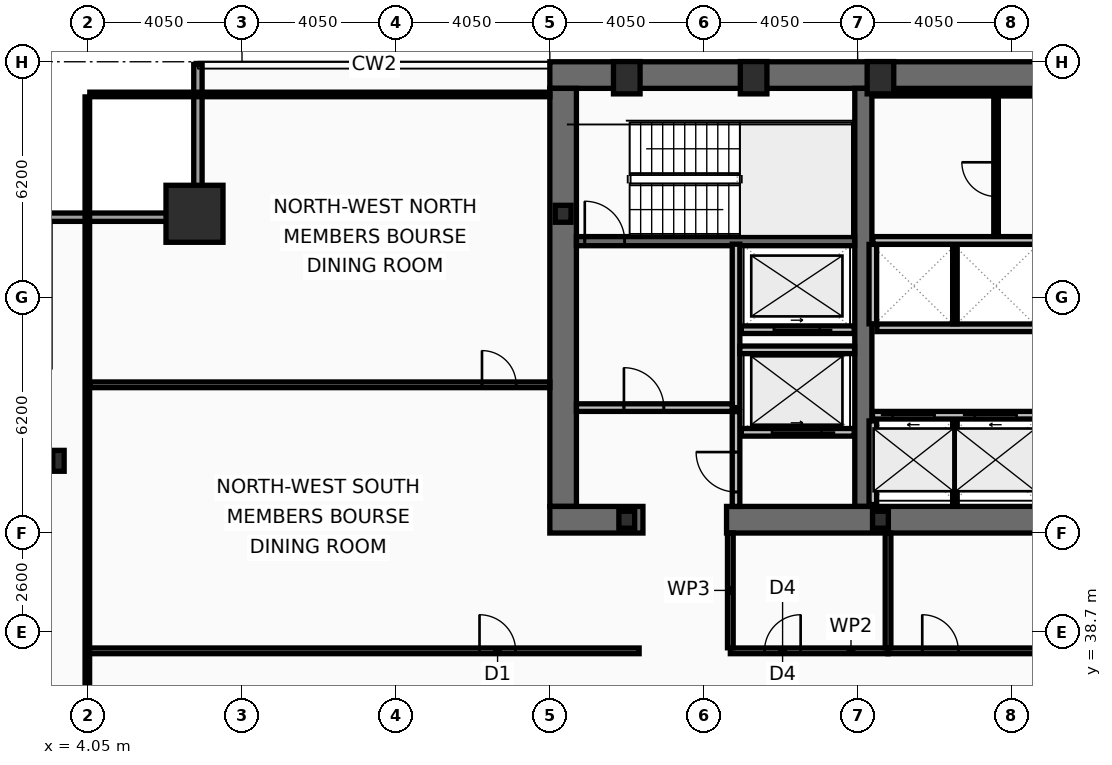
"""IFC4 building model, lengths in metres.
Left out: names, types, materials, properties, quantities, classifications, styles, units other than length and angle.
Written with IfcOpenShell. Run it as: python <this file> out.ifc"""

import sys

from ifc_helpers import new_model, si_unit, direction, frame, frame_2d, origin, origin_2d, place, context, subcontext, project, spatial, rectangle, hollow_rectangle, i_section, extrude, element, fill, save


model = new_model("IFC4")
c1 = context("Model", 3, precision=1e-05, world=origin(), true_north=direction((0.0, 1.0)))
c2 = subcontext(c1, "Body", "Model", "MODEL_VIEW")
j1 = project(units=[si_unit("LENGTHUNIT", "METRE"), si_unit("PLANEANGLEUNIT", "RADIAN")], contexts=[c1])
p1 = place(None, origin())
s1 = spatial("IfcSite", under=j1, at=p1, CompositionType="ELEMENT")
p2 = place(p1, origin())
s2 = spatial("IfcBuilding", under=s1, at=p2, CompositionType="ELEMENT")
p3 = place(p2, frame((0.0, 0.0, 111.0)))
s3 = spatial("IfcBuildingStorey", under=s2, at=p3, CompositionType="ELEMENT", Elevation=111.0)
p4 = place(p3, frame((16.2, 53.35, 0.0), z_axis=(0.0, 0.0, 1.0), x_axis=(1.0, 0.0, 0.0)))
e1 = element("IfcWall", 1, at=p4, inside=s3, PredefinedType="SHEAR", context=c2, shape_type="SweptSolid", body=[
    extrude(rectangle(XDim=40.5, YDim=0.7, at=frame_2d((20.25, 0.0))), origin(), (0.0, 0.0, 1.0), 3.44),
])
p5 = place(p3, frame((16.55, 42.0, 0.0), z_axis=(0.0, 0.0, 1.0), x_axis=(0.0, 1.0, 0.0)))
e2 = element("IfcWall", 2, at=p5, inside=s3, PredefinedType="SHEAR", context=c2, shape_type="SweptSolid", body=[
    extrude(rectangle(XDim=11.0, YDim=0.7, at=frame_2d((5.5, 0.0))), origin(), (0.0, 0.0, 1.0), 3.44),
])
p6 = place(p3, frame((24.45, 42.0, 0.0), z_axis=(0.0, 0.0, 1.0), x_axis=(0.0, 1.0, 0.0)))
e3 = element("IfcWall", 3, at=p6, inside=s3, PredefinedType="SHEAR", context=c2, shape_type="SweptSolid", body=[
    extrude(rectangle(XDim=11.0, YDim=0.45, at=frame_2d((5.5, 0.0))), origin(), (0.0, 0.0, 1.0), 3.44),
])
p7 = place(p3, frame((18.65, 41.65, 0.0), z_axis=(0.0, 0.0, 1.0), x_axis=(-1.0, 0.0, 0.0)))
e4 = element("IfcWall", 4, at=p7, inside=s3, PredefinedType="SHEAR", context=c2, shape_type="SweptSolid", body=[
    extrude(rectangle(XDim=2.45, YDim=0.7, at=frame_2d((1.225, 0.0))), origin(), (0.0, 0.0, 1.0), 3.44),
])
p8 = place(p3, frame((32.3, 41.65, 0.0), z_axis=(0.0, 0.0, 1.0), x_axis=(-1.0, 0.0, 0.0)))
e5 = element("IfcWall", 5, at=p8, inside=s3, PredefinedType="SHEAR", context=c2, shape_type="SweptSolid", body=[
    extrude(rectangle(XDim=11.45, YDim=0.7, at=frame_2d((5.725, 0.0))), origin(), (0.0, 0.0, 1.0), 3.44),
])
p9 = place(p3, frame((16.9, 48.98, 0.0), z_axis=(0.0, 0.0, 1.0), x_axis=(1.0, 0.0, 0.0)))
e6 = element("IfcWall", 6, at=p9, inside=s3, PredefinedType="SHEAR", context=c2, shape_type="SweptSolid", body=[
    extrude(rectangle(XDim=7.32, YDim=0.24, at=frame_2d((3.66, 0.0))), origin(), (0.0, 0.0, 1.0), 3.44),
])
p10 = place(p9, frame((0.22, 0.0, 0.0)))
e7 = element("IfcOpeningElement", 7, at=p10, cuts=e6, PredefinedType="OPENING", context=c2, shape_type="SweptSolid", body=[
    extrude(rectangle(XDim=1.05, YDim=2.15, at=frame_2d((0.525, 1.075))), frame((0.0, 0.13, 0.0), z_axis=(0.0, -1.0, 0.0), x_axis=(1.0, 0.0, 0.0)), (0.0, 0.0, 1.0), 0.26),
])
p11 = place(p3, frame((6.85, 49.7, 0.0), z_axis=(0.0, 0.0, 1.0), x_axis=(1.0, 0.0, 0.0)))
e8 = element("IfcColumn", 8, at=p11, inside=s3, PredefinedType="COLUMN", context=c2, shape_type="SweptSolid", body=[
    extrude(hollow_rectangle(XDim=1.5, YDim=1.5, WallThickness=0.07, at=origin_2d()), origin(), (0.0, 0.0, 1.0), 3.6),
])
for number, where, z_axis, x_axis in (
    (9, (18.225, 53.28, 0.0), (0.0, 0.0, 1.0), (1.0, 0.0, 0.0)),
    (10, (21.562, 53.28, 0.0), (0.0, 0.0, 1.0), (1.0, 0.0, 0.0)),
    (11, (24.9, 53.28, 0.0), (0.0, 0.0, 1.0), (1.0, 0.0, 0.0)),
):
    element("IfcColumn", number, at=place(p3, frame(where, z_axis=z_axis, x_axis=x_axis)), inside=s3, PredefinedType="COLUMN", context=c2, shape_type="SweptSolid", body=[
        extrude(hollow_rectangle(XDim=0.7, YDim=0.85, WallThickness=0.05, at=origin_2d()), origin(), (0.0, 0.0, 1.0), 3.6),
    ])
p12 = place(p3, frame((3.27, 43.2, 0.0), z_axis=(0.0, 0.0, 1.0), x_axis=(1.0, 0.0, 0.0)))
e12 = element("IfcColumn", 12, at=p12, inside=s3, PredefinedType="COLUMN", context=c2, shape_type="SweptSolid", body=[
    extrude(i_section(OverallWidth=0.3, OverallDepth=0.55, WebThickness=0.015, FlangeThickness=0.029, at=origin_2d()), origin(), (0.0, 0.0, 1.0), 3.6),
])
for number, where, z_axis, x_axis in (
    (13, (16.55, 49.7, 0.0), (0.0, 0.0, 1.0), (1.0, 0.0, 0.0)),
    (14, (18.225, 41.65, 0.0), (0.0, 0.0, 1.0), (1.0, 0.0, 0.0)),
    (15, (24.9, 41.65, 0.0), (0.0, 0.0, 1.0), (1.0, 0.0, 0.0)),
):
    element("IfcColumn", number, at=place(p3, frame(where, z_axis=z_axis, x_axis=x_axis)), inside=s3, PredefinedType="COLUMN", context=c2, shape_type="SweptSolid", body=[
        extrude(i_section(OverallWidth=0.416, OverallDepth=0.446, WebThickness=0.039, FlangeThickness=0.063, at=origin_2d()), origin(), (0.0, 0.0, 1.0), 3.6),
    ])
p13 = place(p3, frame((2.83, 49.61, 0.0), z_axis=(0.0, 0.0, 1.0), x_axis=(1.0, 0.0, 0.0)))
e16 = element("IfcWall", 16, at=p13, inside=s3, PredefinedType="SOLIDWALL", context=c2, shape_type="SweptSolid", body=[
    extrude(rectangle(XDim=4.22, YDim=0.22, at=frame_2d((2.11, 0.0))), origin(), (0.0, 0.0, 1.0), 2.83),
])
p14 = place(p3, frame((6.94, 49.72, 0.0), z_axis=(0.0, 0.0, 1.0), x_axis=(0.0, 1.0, 0.0)))
e17 = element("IfcWall", 17, at=p14, inside=s3, PredefinedType="SOLIDWALL", context=c2, shape_type="SweptSolid", body=[
    extrude(rectangle(XDim=3.91, YDim=0.22, at=frame_2d((1.955, 0.0))), origin(), (0.0, 0.0, 1.0), 2.83),
])
p15 = place(p3, frame((24.69, 44.4, 0.0), z_axis=(0.0, 0.0, 1.0), x_axis=(1.0, 0.0, 0.0)))
e18 = element("IfcWall", 18, at=p15, inside=s3, PredefinedType="PARTITIONING", context=c2, shape_type="SweptSolid", body=[
    extrude(rectangle(XDim=6.53, YDim=0.2, at=frame_2d((3.265, 0.0))), origin(), (0.0, 0.0, 1.0), 3.44),
])
p16 = place(p15, frame((0.53, 0.0, 0.0)))
e19 = element("IfcOpeningElement", 19, at=p16, cuts=e18, PredefinedType="OPENING", context=c2, shape_type="SweptSolid", body=[
    extrude(rectangle(XDim=1.1, YDim=2.18, at=frame_2d((0.55, 1.09))), frame((0.0, 0.11, 0.0), z_axis=(0.0, -1.0, 0.0), x_axis=(1.0, 0.0, 0.0)), (0.0, 0.0, 1.0), 0.22),
])
p17 = place(p15, frame((2.69, 0.0, 0.0)))
e20 = element("IfcOpeningElement", 20, at=p17, cuts=e18, PredefinedType="OPENING", context=c2, shape_type="SweptSolid", body=[
    extrude(rectangle(XDim=1.1, YDim=2.18, at=frame_2d((0.55, 1.09))), frame((0.0, 0.11, 0.0), z_axis=(0.0, -1.0, 0.0), x_axis=(1.0, 0.0, 0.0)), (0.0, 0.0, 1.0), 0.22),
])
p18 = place(p15, frame((4.85, 0.0, 0.0)))
e21 = element("IfcOpeningElement", 21, at=p18, cuts=e18, PredefinedType="OPENING", context=c2, shape_type="SweptSolid", body=[
    extrude(rectangle(XDim=1.1, YDim=2.18, at=frame_2d((0.55, 1.09))), frame((0.0, 0.11, 0.0), z_axis=(0.0, -1.0, 0.0), x_axis=(1.0, 0.0, 0.0)), (0.0, 0.0, 1.0), 0.22),
])
p19 = place(p3, frame((24.21, 43.95, 0.0), z_axis=(0.0, 0.0, 1.0), x_axis=(-1.0, 0.0, 0.0)))
e22 = element("IfcWall", 22, at=p19, inside=s3, PredefinedType="PARTITIONING", context=c2, shape_type="SweptSolid", body=[
    extrude(rectangle(XDim=2.97, YDim=0.2, at=frame_2d((1.485, 0.0))), origin(), (0.0, 0.0, 1.0), 3.44),
])
p20 = place(p19, frame((0.86, 0.0, 0.0)))
e23 = element("IfcOpeningElement", 23, at=p20, cuts=e22, PredefinedType="OPENING", context=c2, shape_type="SweptSolid", body=[
    extrude(rectangle(XDim=1.3, YDim=2.18, at=frame_2d((0.65, 1.09))), frame((0.0, 0.11, 0.0), z_axis=(0.0, -1.0, 0.0), x_axis=(1.0, 0.0, 0.0)), (0.0, 0.0, 1.0), 0.22),
])
p21 = place(p3, frame((24.21, 46.65, 0.0), z_axis=(0.0, 0.0, 1.0), x_axis=(-1.0, 0.0, 0.0)))
e24 = element("IfcWall", 24, at=p21, inside=s3, PredefinedType="PARTITIONING", context=c2, shape_type="SweptSolid", body=[
    extrude(rectangle(XDim=2.97, YDim=0.2, at=frame_2d((1.485, 0.0))), origin(), (0.0, 0.0, 1.0), 3.44),
])
p22 = place(p21, frame((0.91, 0.0, 0.0)))
e25 = element("IfcOpeningElement", 25, at=p22, cuts=e24, PredefinedType="OPENING", context=c2, shape_type="SweptSolid", body=[
    extrude(rectangle(XDim=1.2, YDim=2.18, at=frame_2d((0.6, 1.09))), frame((0.0, 0.11, 0.0), z_axis=(0.0, -1.0, 0.0), x_axis=(1.0, 0.0, 0.0)), (0.0, 0.0, 1.0), 0.22),
])
p23 = place(p3, frame((21.1, 44.6, 0.0), z_axis=(0.0, 0.0, 1.0), x_axis=(0.0, 1.0, 0.0)))
e26 = element("IfcWall", 26, at=p23, inside=s3, PredefinedType="PARTITIONING", context=c2, shape_type="SweptSolid", body=[
    extrude(rectangle(XDim=4.3, YDim=0.2, at=frame_2d((2.15, 0.0))), origin(), (0.0, 0.0, 1.0), 3.44),
])
p24 = place(p3, frame((16.9, 44.6, 0.0), z_axis=(0.0, 0.0, 1.0), x_axis=(1.0, 0.0, 0.0)))
e27 = element("IfcWall", 27, at=p24, inside=s3, PredefinedType="PARTITIONING", context=c2, shape_type="SweptSolid", body=[
    extrude(rectangle(XDim=4.1, YDim=0.2, at=frame_2d((2.05, 0.0))), origin(), (0.0, 0.0, 1.0), 3.44),
])
p25 = place(p24, frame((1.25, 0.0, 0.0)))
e28 = element("IfcOpeningElement", 28, at=p25, cuts=e27, PredefinedType="OPENING", context=c2, shape_type="SweptSolid", body=[
    extrude(rectangle(XDim=1.05, YDim=2.15, at=frame_2d((0.525, 1.075))), frame((0.0, 0.11, 0.0), z_axis=(0.0, -1.0, 0.0), x_axis=(1.0, 0.0, 0.0)), (0.0, 0.0, 1.0), 0.22),
])
p26 = place(p3, frame((21.2, 46.12, 0.0), z_axis=(0.0, 0.0, 1.0), x_axis=(1.0, 0.0, 0.0)))
e29 = element("IfcWall", 29, at=p26, inside=s3, PredefinedType="PARTITIONING", context=c2, shape_type="SweptSolid", body=[
    extrude(rectangle(XDim=3.02, YDim=0.2, at=frame_2d((1.51, 0.0))), origin(), (0.0, 0.0, 1.0), 3.44),
])
p27 = place(p3, frame((21.1, 42.0, 0.0), z_axis=(0.0, 0.0, 1.0), x_axis=(0.0, 1.0, 0.0)))
e30 = element("IfcWall", 30, at=p27, inside=s3, PredefinedType="PARTITIONING", context=c2, shape_type="SweptSolid", body=[
    extrude(rectangle(XDim=2.495, YDim=0.2, at=frame_2d((1.248, 0.0))), origin(), (0.0, 0.0, 1.0), 3.44),
])
p28 = place(p27, frame((0.38, 0.0, 0.0)))
e31 = element("IfcOpeningElement", 31, at=p28, cuts=e30, PredefinedType="OPENING", context=c2, shape_type="SweptSolid", body=[
    extrude(rectangle(XDim=1.05, YDim=2.15, at=frame_2d((0.525, 1.075))), frame((0.0, 0.11, 0.0), z_axis=(0.0, -1.0, 0.0), x_axis=(1.0, 0.0, 0.0)), (0.0, 0.0, 1.0), 0.22),
])
p29 = place(p3, frame((24.805, 46.7, 0.0), z_axis=(0.0, 0.0, 1.0), x_axis=(1.0, 0.0, 0.0)))
e32 = element("IfcWall", 32, at=p29, inside=s3, PredefinedType="PARTITIONING", context=c2, shape_type="SweptSolid", body=[
    extrude(rectangle(XDim=6.27, YDim=0.2, at=frame_2d((3.135, 0.0))), origin(), (0.0, 0.0, 1.0), 3.44),
])
p30 = place(p3, frame((24.7, 46.805, 0.0), z_axis=(0.0, 0.0, 1.0), x_axis=(0.0, 1.0, 0.0)))
e33 = element("IfcWall", 33, at=p30, inside=s3, PredefinedType="PARTITIONING", context=c2, shape_type="SweptSolid", body=[
    extrude(rectangle(XDim=2.09, YDim=0.2, at=frame_2d((1.045, 0.0))), origin(), (0.0, 0.0, 1.0), 3.44),
])
p31 = place(p3, frame((26.86, 46.805, 0.0), z_axis=(0.0, 0.0, 1.0), x_axis=(0.0, 1.0, 0.0)))
e34 = element("IfcWall", 34, at=p31, inside=s3, PredefinedType="PARTITIONING", context=c2, shape_type="SweptSolid", body=[
    extrude(rectangle(XDim=2.09, YDim=0.12, at=frame_2d((1.045, 0.0))), origin(), (0.0, 0.0, 1.0), 3.44),
])
p32 = place(p3, frame((24.7, 42.05, 0.0), z_axis=(0.0, 0.0, 1.0), x_axis=(0.0, 1.0, 0.0)))
e35 = element("IfcWall", 35, at=p32, inside=s3, PredefinedType="PARTITIONING", context=c2, shape_type="SweptSolid", body=[
    extrude(rectangle(XDim=2.2, YDim=0.2, at=frame_2d((1.1, 0.0))), origin(), (0.0, 0.0, 1.0), 3.44),
])
p33 = place(p3, frame((26.86, 42.05, 0.0), z_axis=(0.0, 0.0, 1.0), x_axis=(0.0, 1.0, 0.0)))
e36 = element("IfcWall", 36, at=p33, inside=s3, PredefinedType="PARTITIONING", context=c2, shape_type="SweptSolid", body=[
    extrude(rectangle(XDim=2.2, YDim=0.12, at=frame_2d((1.1, 0.0))), origin(), (0.0, 0.0, 1.0), 3.44),
])
p34 = place(p3, frame((24.7, 52.86, 0.0), z_axis=(0.0, 0.0, 1.0), x_axis=(1.0, 0.0, 0.0)))
e37 = element("IfcWall", 37, at=p34, inside=s3, PredefinedType="PARTITIONING", context=c2, shape_type="SweptSolid", body=[
    extrude(rectangle(XDim=7.72, YDim=0.12, at=frame_2d((3.86, 0.0))), origin(), (0.0, 0.0, 1.0), 3.44),
])
p35 = place(p3, frame((24.7, 49.0, 0.0), z_axis=(0.0, 0.0, 1.0), x_axis=(1.0, 0.0, 0.0)))
e38 = element("IfcWall", 38, at=p35, inside=s3, PredefinedType="PARTITIONING", context=c2, shape_type="SweptSolid", body=[
    extrude(rectangle(XDim=7.72, YDim=0.2, at=frame_2d((3.86, 0.0))), origin(), (0.0, 0.0, 1.0), 3.44),
])
p36 = place(p35, frame((6.56, 0.0, 0.0)))
e39 = element("IfcOpeningElement", 39, at=p36, cuts=e38, PredefinedType="OPENING", context=c2, shape_type="SweptSolid", body=[
    extrude(rectangle(XDim=0.95, YDim=2.1, at=frame_2d((0.475, 1.05))), frame((0.0, 0.11, 0.0), z_axis=(0.0, -1.0, 0.0), x_axis=(1.0, 0.0, 0.0)), (0.0, 0.0, 1.0), 0.22),
])
p37 = place(p3, frame((27.942, 49.105, 0.0), z_axis=(0.0, 0.0, 1.0), x_axis=(0.0, 1.0, 0.0)))
e40 = element("IfcWall", 40, at=p37, inside=s3, PredefinedType="PARTITIONING", context=c2, shape_type="SweptSolid", body=[
    extrude(rectangle(XDim=3.69, YDim=0.12, at=frame_2d((1.845, 0.0))), origin(), (0.0, 0.0, 1.0), 3.44),
])
p38 = place(p37, frame((1.05, 0.0, 0.0)))
e41 = element("IfcOpeningElement", 41, at=p38, cuts=e40, PredefinedType="OPENING", context=c2, shape_type="SweptSolid", body=[
    extrude(rectangle(XDim=0.9, YDim=2.05, at=frame_2d((0.45, 1.025))), frame((0.0, 0.07, 0.0), z_axis=(0.0, -1.0, 0.0), x_axis=(1.0, 0.0, 0.0)), (0.0, 0.0, 1.0), 0.14),
])
p39 = place(p3, frame((20.95, 38.2, 0.0), z_axis=(0.0, 0.0, 1.0), x_axis=(1.0, 0.0, 0.0)))
e42 = element("IfcWall", 42, at=p39, inside=s3, PredefinedType="PARTITIONING", context=c2, shape_type="SweptSolid", body=[
    extrude(rectangle(XDim=4.15, YDim=0.15, at=frame_2d((2.075, 0.0))), origin(), (0.0, 0.0, 1.0), 2.73),
])
p40 = place(p39, frame((0.9, 0.0, 0.0)))
e43 = element("IfcOpeningElement", 43, at=p40, cuts=e42, PredefinedType="OPENING", context=c2, shape_type="SweptSolid", body=[
    extrude(rectangle(XDim=0.95, YDim=2.05, at=frame_2d((0.475, 1.025))), frame((0.0, 0.085, 0.0), z_axis=(0.0, -1.0, 0.0), x_axis=(1.0, 0.0, 0.0)), (0.0, 0.0, 1.0), 0.17),
])
p41 = place(p3, frame((25.1, 38.2, 0.0), z_axis=(0.0, 0.0, 1.0), x_axis=(1.0, 0.0, 0.0)))
e44 = element("IfcWall", 44, at=p41, inside=s3, PredefinedType="PARTITIONING", context=c2, shape_type="SweptSolid", body=[
    extrude(rectangle(XDim=4.1, YDim=0.15, at=frame_2d((2.05, 0.0))), origin(), (0.0, 0.0, 1.0), 2.73),
])
p42 = place(p41, frame((0.9, 0.0, 0.0)))
e45 = element("IfcOpeningElement", 45, at=p42, cuts=e44, PredefinedType="OPENING", context=c2, shape_type="SweptSolid", body=[
    extrude(rectangle(XDim=0.95, YDim=2.05, at=frame_2d((0.475, 1.025))), frame((0.0, 0.085, 0.0), z_axis=(0.0, -1.0, 0.0), x_axis=(1.0, 0.0, 0.0)), (0.0, 0.0, 1.0), 0.17),
])
p43 = place(p3, frame((20.95, 38.28, 0.0), z_axis=(0.0, 0.0, 1.0), x_axis=(0.0, 1.0, 0.0)))
e46 = element("IfcWall", 46, at=p43, inside=s3, PredefinedType="PARTITIONING", context=c2, shape_type="SweptSolid", body=[
    extrude(rectangle(XDim=3.02, YDim=0.15, at=frame_2d((1.51, 0.0))), origin(), (0.0, 0.0, 1.0), 3.44),
])
p44 = place(p3, frame((25.1, 38.28, 0.0), z_axis=(0.0, 0.0, 1.0), x_axis=(0.0, 1.0, 0.0)))
e47 = element("IfcWall", 47, at=p44, inside=s3, PredefinedType="PARTITIONING", context=c2, shape_type="SweptSolid", body=[
    extrude(rectangle(XDim=3.02, YDim=0.15, at=frame_2d((1.51, 0.0))), origin(), (0.0, 0.0, 1.0), 2.73),
])
p45 = place(p3, frame((4.03, 38.2, 0.0), z_axis=(0.0, 0.0, 1.0), x_axis=(1.0, 0.0, 0.0)))
e48 = element("IfcWall", 48, at=p45, inside=s3, PredefinedType="PARTITIONING", context=c2, shape_type="SweptSolid", body=[
    extrude(rectangle(XDim=14.52, YDim=0.15, at=frame_2d((7.26, 0.0))), origin(), (0.0, 0.0, 1.0), 2.73),
])
p46 = place(p45, frame((10.32, 0.0, 0.0)))
e49 = element("IfcOpeningElement", 49, at=p46, cuts=e48, PredefinedType="OPENING", context=c2, shape_type="SweptSolid", body=[
    extrude(rectangle(XDim=0.95, YDim=2.05, at=frame_2d((0.475, 1.025))), frame((0.0, 0.085, 0.0), z_axis=(0.0, -1.0, 0.0), x_axis=(1.0, 0.0, 0.0)), (0.0, 0.0, 1.0), 0.17),
])
p47 = place(p3, frame((4.095, 45.2, 0.0), z_axis=(0.0, 0.0, 1.0), x_axis=(1.0, 0.0, 0.0)))
e50 = element("IfcWall", 50, at=p47, inside=s3, PredefinedType="PARTITIONING", context=c2, shape_type="SweptSolid", body=[
    extrude(rectangle(XDim=12.105, YDim=0.15, at=frame_2d((6.052, 0.0))), origin(), (0.0, 0.0, 1.0), 2.83),
])
p48 = place(p47, frame((10.32, 0.0, 0.0)))
e51 = element("IfcOpeningElement", 51, at=p48, cuts=e50, PredefinedType="OPENING", context=c2, shape_type="SweptSolid", body=[
    extrude(rectangle(XDim=0.9, YDim=2.05, at=frame_2d((0.45, 1.025))), frame((0.0, 0.085, 0.0), z_axis=(0.0, -1.0, 0.0), x_axis=(1.0, 0.0, 0.0)), (0.0, 0.0, 1.0), 0.17),
])
p49 = place(p3, frame((4.03, 10.665, 0.0), z_axis=(0.0, 0.0, 1.0), x_axis=(0.0, 1.0, 0.0)))
e52 = element("IfcWall", 52, at=p49, inside=s3, PredefinedType="PARTITIONING", context=c2, shape_type="SweptSolid", body=[
    extrude(rectangle(XDim=42.11, YDim=0.12, at=frame_2d((21.055, 0.0))), origin(), (0.0, 0.0, 1.0), 2.73),
])
p50 = place(p3, frame((4.095, 52.84, 0.0), z_axis=(0.0, 0.0, 1.0), x_axis=(1.0, 0.0, 0.0)))
e53 = element("IfcWall", 53, at=p50, inside=s3, PredefinedType="PARTITIONING", context=c2, shape_type="SweptSolid", body=[
    extrude(rectangle(XDim=12.105, YDim=0.12, at=frame_2d((6.052, 0.0))), origin(), (0.0, 0.0, 1.0), 3.44),
])
p51 = place(p10, origin())
e54 = element("IfcDoor", 54, at=p51, inside=s3, OperationType="SINGLE_SWING_LEFT", PredefinedType="DOOR", context=c2, shape_type="SweptSolid", body=[
    extrude(rectangle(XDim=1.05, YDim=2.15, at=frame_2d((0.525, 1.075))), frame((0.0, 0.025, 0.0), z_axis=(0.0, -1.0, 0.0), x_axis=(1.0, 0.0, 0.0)), (0.0, 0.0, 1.0), 0.05),
])
fill(e7, e54)
p52 = place(p16, origin())
e55 = element("IfcDoor", 55, at=p52, inside=s3, OperationType="SLIDING_TO_LEFT", PredefinedType="DOOR", context=c2, shape_type="SweptSolid", body=[
    extrude(rectangle(XDim=1.1, YDim=2.18, at=frame_2d((0.55, 1.09))), frame((0.0, 0.025, 0.0), z_axis=(0.0, -1.0, 0.0), x_axis=(1.0, 0.0, 0.0)), (0.0, 0.0, 1.0), 0.05),
])
fill(e19, e55)
p53 = place(p17, origin())
e56 = element("IfcDoor", 56, at=p53, inside=s3, OperationType="SLIDING_TO_LEFT", PredefinedType="DOOR", context=c2, shape_type="SweptSolid", body=[
    extrude(rectangle(XDim=1.1, YDim=2.18, at=frame_2d((0.55, 1.09))), frame((0.0, 0.025, 0.0), z_axis=(0.0, -1.0, 0.0), x_axis=(1.0, 0.0, 0.0)), (0.0, 0.0, 1.0), 0.05),
])
fill(e20, e56)
p54 = place(p20, origin())
e57 = element("IfcDoor", 57, at=p54, inside=s3, OperationType="SLIDING_TO_LEFT", PredefinedType="DOOR", context=c2, shape_type="SweptSolid", body=[
    extrude(rectangle(XDim=1.3, YDim=2.18, at=frame_2d((0.65, 1.09))), frame((0.0, 0.025, 0.0), z_axis=(0.0, -1.0, 0.0), x_axis=(1.0, 0.0, 0.0)), (0.0, 0.0, 1.0), 0.05),
])
fill(e23, e57)
p55 = place(p22, origin())
e58 = element("IfcDoor", 58, at=p55, inside=s3, OperationType="SLIDING_TO_LEFT", PredefinedType="DOOR", context=c2, shape_type="SweptSolid", body=[
    extrude(rectangle(XDim=1.2, YDim=2.18, at=frame_2d((0.6, 1.09))), frame((0.0, 0.025, 0.0), z_axis=(0.0, -1.0, 0.0), x_axis=(1.0, 0.0, 0.0)), (0.0, 0.0, 1.0), 0.05),
])
fill(e25, e58)
p56 = place(p25, origin())
e59 = element("IfcDoor", 59, at=p56, inside=s3, OperationType="SINGLE_SWING_LEFT", PredefinedType="DOOR", context=c2, shape_type="SweptSolid", body=[
    extrude(rectangle(XDim=1.05, YDim=2.15, at=frame_2d((0.525, 1.075))), frame((0.0, 0.025, 0.0), z_axis=(0.0, -1.0, 0.0), x_axis=(1.0, 0.0, 0.0)), (0.0, 0.0, 1.0), 0.05),
])
fill(e28, e59)
p57 = place(p28, origin())
e60 = element("IfcDoor", 60, at=p57, inside=s3, OperationType="SINGLE_SWING_RIGHT", PredefinedType="DOOR", context=c2, shape_type="SweptSolid", body=[
    extrude(rectangle(XDim=1.05, YDim=2.15, at=frame_2d((0.525, 1.075))), frame((0.0, 0.025, 0.0), z_axis=(0.0, -1.0, 0.0), x_axis=(1.0, 0.0, 0.0)), (0.0, 0.0, 1.0), 0.05),
])
fill(e31, e60)
p58 = place(p38, origin())
e61 = element("IfcDoor", 61, at=p58, inside=s3, OperationType="SINGLE_SWING_RIGHT", PredefinedType="DOOR", context=c2, shape_type="SweptSolid", body=[
    extrude(rectangle(XDim=0.9, YDim=2.05, at=frame_2d((0.45, 1.025))), frame((0.0, 0.025, 0.0), z_axis=(0.0, -1.0, 0.0), x_axis=(1.0, 0.0, 0.0)), (0.0, 0.0, 1.0), 0.05),
])
fill(e41, e61)
p59 = place(p40, origin())
e62 = element("IfcDoor", 62, at=p59, inside=s3, OperationType="SINGLE_SWING_RIGHT", PredefinedType="DOOR", context=c2, shape_type="SweptSolid", body=[
    extrude(rectangle(XDim=0.95, YDim=2.05, at=frame_2d((0.475, 1.025))), frame((0.0, 0.025, 0.0), z_axis=(0.0, -1.0, 0.0), x_axis=(1.0, 0.0, 0.0)), (0.0, 0.0, 1.0), 0.05),
])
fill(e43, e62)
p60 = place(p42, origin())
e63 = element("IfcDoor", 63, at=p60, inside=s3, OperationType="SINGLE_SWING_LEFT", PredefinedType="DOOR", context=c2, shape_type="SweptSolid", body=[
    extrude(rectangle(XDim=0.95, YDim=2.05, at=frame_2d((0.475, 1.025))), frame((0.0, 0.025, 0.0), z_axis=(0.0, -1.0, 0.0), x_axis=(1.0, 0.0, 0.0)), (0.0, 0.0, 1.0), 0.05),
])
fill(e45, e63)
p61 = place(p46, origin())
e64 = element("IfcDoor", 64, at=p61, inside=s3, OperationType="SINGLE_SWING_LEFT", PredefinedType="DOOR", context=c2, shape_type="SweptSolid", body=[
    extrude(rectangle(XDim=0.95, YDim=2.05, at=frame_2d((0.475, 1.025))), frame((0.0, 0.025, 0.0), z_axis=(0.0, -1.0, 0.0), x_axis=(1.0, 0.0, 0.0)), (0.0, 0.0, 1.0), 0.05),
])
fill(e49, e64)
p62 = place(p48, origin())
e65 = element("IfcDoor", 65, at=p62, inside=s3, OperationType="SINGLE_SWING_LEFT", PredefinedType="DOOR", context=c2, shape_type="SweptSolid", body=[
    extrude(rectangle(XDim=0.9, YDim=2.05, at=frame_2d((0.45, 1.025))), frame((0.0, 0.025, 0.0), z_axis=(0.0, -1.0, 0.0), x_axis=(1.0, 0.0, 0.0)), (0.0, 0.0, 1.0), 0.05),
])
fill(e51, e65)
save(model, sys.argv[1])
